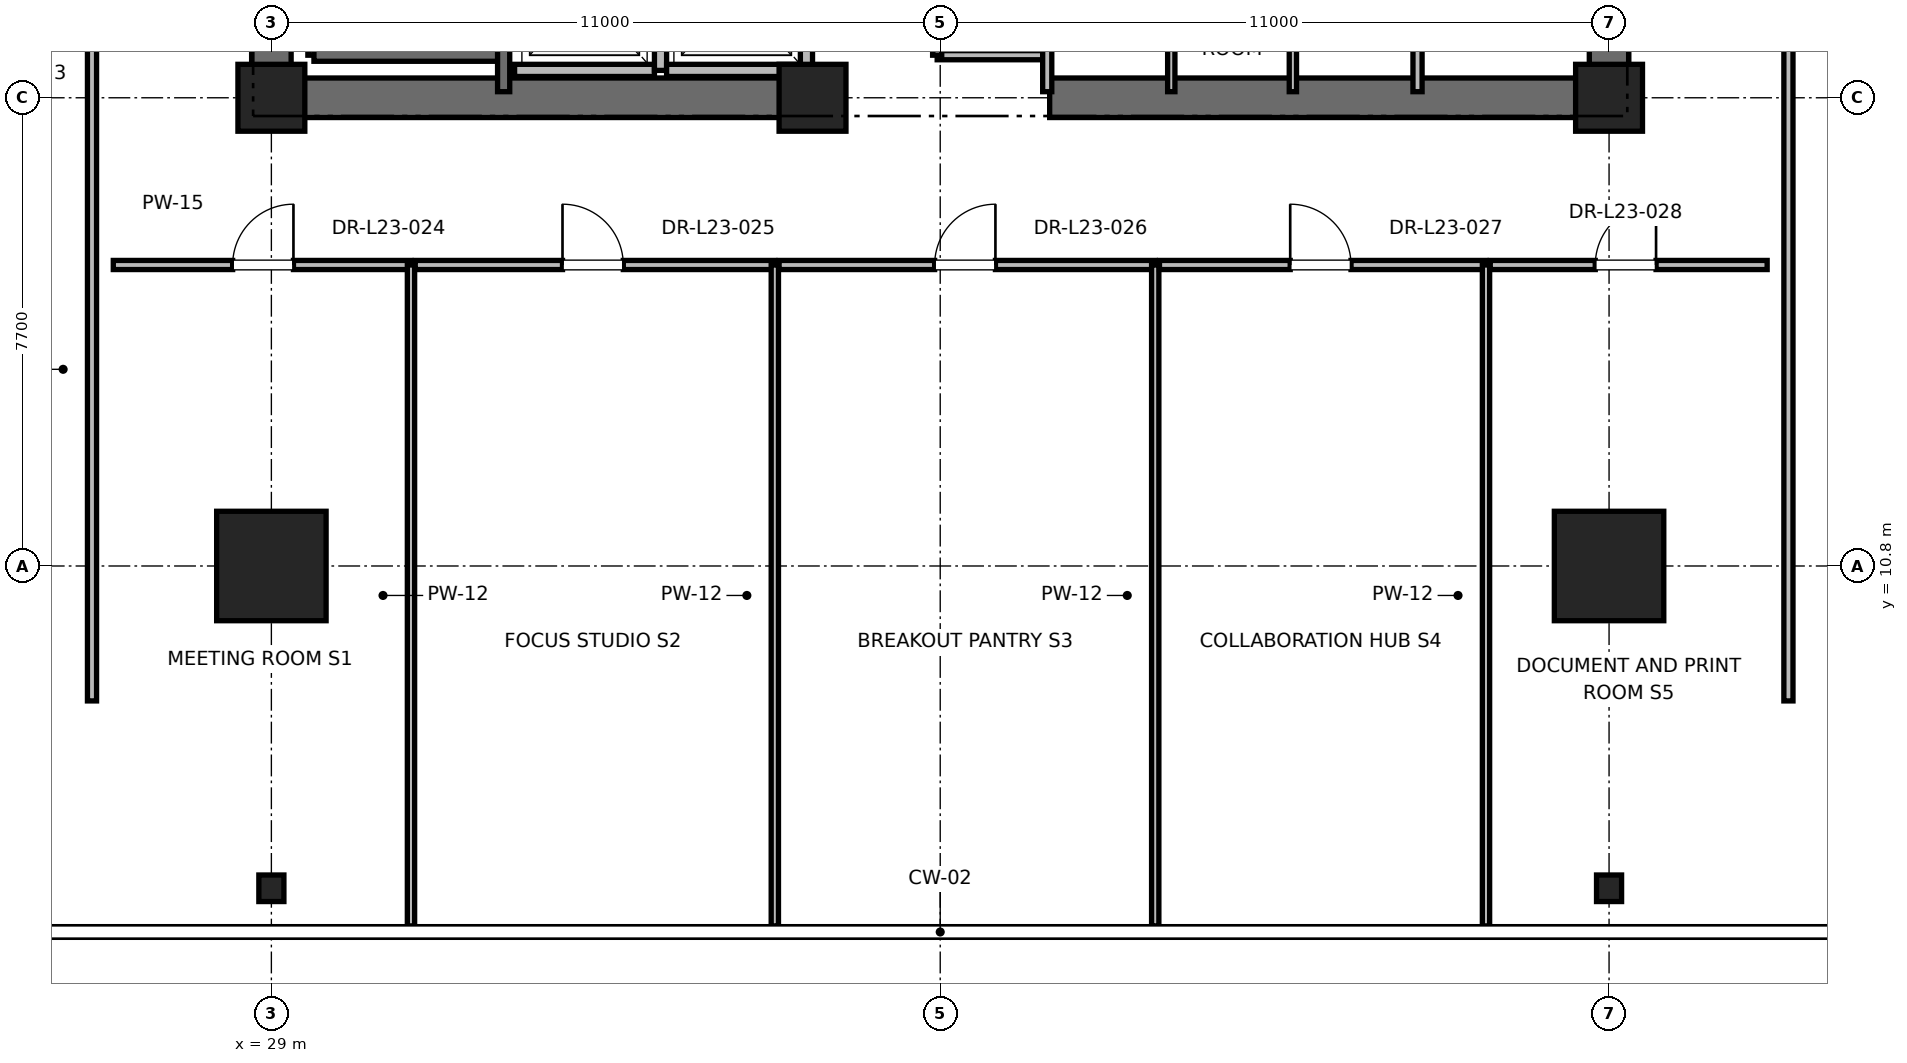
"""IFC4 building model, lengths in metres.
Left out: names, types, materials, properties, quantities, classifications, styles, units other than length and angle.
Written with IfcOpenShell. Run it as: python <this file> out.ifc"""

import sys

from ifc_helpers import new_model, si_unit, direction, frame, frame_2d, origin, origin_2d, place, context, subcontext, project, spatial, rectangle, i_section, extrude, element, fill, save


model = new_model("IFC4")
c1 = context("Model", 3, precision=1e-05, world=origin(), true_north=direction((0.0, 1.0)))
c2 = subcontext(c1, "Body", "Model", "MODEL_VIEW")
j1 = project(units=[si_unit("LENGTHUNIT", "METRE"), si_unit("PLANEANGLEUNIT", "RADIAN")], contexts=[c1])
p1 = place(None, origin())
s1 = spatial("IfcSite", under=j1, at=p1, CompositionType="ELEMENT")
p2 = place(p1, origin())
s2 = spatial("IfcBuilding", under=s1, at=p2, CompositionType="ELEMENT")
p3 = place(p2, frame((0.0, 0.0, 99.6)))
s3 = spatial("IfcBuildingStorey", under=s2, at=p3, CompositionType="ELEMENT", Elevation=99.6)
for number, where, z_axis, x_axis in (
    (1, (29.0, 10.8, 0.0), (0.0, 0.0, 1.0), (1.0, 0.0, 0.0)),
    (2, (51.0, 10.8, 0.0), (0.0, 0.0, 1.0), (1.0, 0.0, 0.0)),
):
    element("IfcColumn", number, at=place(p3, frame(where, z_axis=z_axis, x_axis=x_axis)), inside=s3, PredefinedType="COLUMN", context=c2, shape_type="SweptSolid", body=[
        extrude(rectangle(XDim=1.8, YDim=1.8, at=origin_2d()), origin(), (0.0, 0.0, 1.0), 4.0),
    ])
for number, where, z_axis, x_axis in (
    (3, (29.0, 5.5, 0.0), (0.0, 0.0, 1.0), (1.0, 0.0, 0.0)),
    (4, (51.0, 5.5, 0.0), (0.0, 0.0, 1.0), (1.0, 0.0, 0.0)),
):
    element("IfcColumn", number, at=place(p3, frame(where, z_axis=z_axis, x_axis=x_axis)), inside=s3, PredefinedType="COLUMN", context=c2, shape_type="SweptSolid", body=[
        extrude(i_section(OverallWidth=0.412, OverallDepth=0.437, WebThickness=0.036, FlangeThickness=0.058, FilletRadius=0.015, at=origin_2d()), origin(), (0.0, 0.0, 1.0), 4.0),
    ])
for number, where, z_axis, x_axis in (
    (5, (29.0, 18.5, 0.0), (0.0, 0.0, 1.0), (1.0, 0.0, 0.0)),
    (6, (51.0, 18.5, 0.0), (0.0, 0.0, 1.0), (1.0, 0.0, 0.0)),
    (7, (37.9, 18.5, 0.0), (0.0, 0.0, 1.0), (1.0, 0.0, 0.0)),
):
    element("IfcColumn", number, at=place(p3, frame(where, z_axis=z_axis, x_axis=x_axis)), inside=s3, PredefinedType="PILASTER", context=c2, shape_type="SweptSolid", body=[
        extrude(rectangle(XDim=1.1, YDim=1.1, at=origin_2d()), origin(), (0.0, 0.0, 1.0), 4.0),
    ])
for number, where, z_axis, x_axis in (
    (8, (29.0, 18.5, 0.0), (0.0, 0.0, 1.0), (1.0, 0.0, 0.0)),
    (9, (41.8, 18.5, 0.0), (0.0, 0.0, 1.0), (1.0, 0.0, 0.0)),
):
    element("IfcWall", number, at=place(p3, frame(where, z_axis=z_axis, x_axis=x_axis)), inside=s3, PredefinedType="SHEAR", context=c2, shape_type="SweptSolid", body=[
        extrude(rectangle(XDim=9.2, YDim=0.65, at=frame_2d((4.6, 0.0))), origin(), (0.0, 0.0, 1.0), 3.76),
    ])
p4 = place(p3, frame((29.0, 18.5, 0.0), z_axis=(0.0, 0.0, 1.0), x_axis=(0.0, 1.0, 0.0)))
e10 = element("IfcWall", 10, at=p4, inside=s3, PredefinedType="SHEAR", context=c2, shape_type="SweptSolid", body=[
    extrude(rectangle(XDim=8.8, YDim=0.65, at=frame_2d((4.4, 0.0))), origin(), (0.0, 0.0, 1.0), 3.76),
])
p5 = place(p3, frame((51.0, 18.5, 0.0), z_axis=(0.0, 0.0, 1.0), x_axis=(0.0, 1.0, 0.0)))
e11 = element("IfcWall", 11, at=p5, inside=s3, PredefinedType="SHEAR", context=c2, shape_type="SweptSolid", body=[
    extrude(rectangle(XDim=5.8, YDim=0.65, at=frame_2d((2.9, 0.0))), origin(), (0.0, 0.0, 1.0), 3.76),
])
p6 = place(p3, frame((29.7, 19.2, 0.0), z_axis=(0.0, 0.0, 1.0), x_axis=(0.0, 1.0, 0.0)))
e12 = element("IfcWall", 12, at=p6, inside=s3, PredefinedType="SOLIDWALL", context=c2, shape_type="SweptSolid", body=[
    extrude(rectangle(XDim=8.15, YDim=0.2, at=frame_2d((4.075, 0.0))), origin(), (0.0, 0.0, 1.0), 3.76),
])
p7 = place(p3, frame((29.7, 19.2, 0.0), z_axis=(0.0, 0.0, 1.0), x_axis=(1.0, 0.0, 0.0)))
e13 = element("IfcWall", 13, at=p7, inside=s3, PredefinedType="SOLIDWALL", context=c2, shape_type="SweptSolid", body=[
    extrude(rectangle(XDim=3.12, YDim=0.2, at=frame_2d((1.56, 0.0))), origin(), (0.0, 0.0, 1.0), 3.76),
])
p8 = place(p3, frame((32.82, 18.6, 0.0), z_axis=(0.0, 0.0, 1.0), x_axis=(0.0, 1.0, 0.0)))
e14 = element("IfcWall", 14, at=p8, inside=s3, PredefinedType="SOLIDWALL", context=c2, shape_type="SweptSolid", body=[
    extrude(rectangle(XDim=8.78, YDim=0.2, at=frame_2d((4.39, 0.0))), origin(), (0.0, 0.0, 1.0), 3.76),
])
p9 = place(p3, frame((33.0, 18.95, 0.0), z_axis=(0.0, 0.0, 1.0), x_axis=(1.0, 0.0, 0.0)))
e15 = element("IfcWall", 15, at=p9, inside=s3, PredefinedType="SOLIDWALL", context=c2, shape_type="SweptSolid", body=[
    extrude(rectangle(XDim=2.3, YDim=0.2, at=frame_2d((1.15, 0.0))), origin(), (0.0, 0.0, 1.0), 3.76),
])
p10 = place(p3, frame((35.4, 18.95, 0.0), z_axis=(0.0, 0.0, 1.0), x_axis=(0.0, 1.0, 0.0)))
e16 = element("IfcWall", 16, at=p10, inside=s3, PredefinedType="SOLIDWALL", context=c2, shape_type="SweptSolid", body=[
    extrude(rectangle(XDim=2.6, YDim=0.2, at=frame_2d((1.3, 0.0))), origin(), (0.0, 0.0, 1.0), 3.76),
])
p11 = place(p3, frame((35.5, 18.95, 0.0), z_axis=(0.0, 0.0, 1.0), x_axis=(1.0, 0.0, 0.0)))
e17 = element("IfcWall", 17, at=p11, inside=s3, PredefinedType="SOLIDWALL", context=c2, shape_type="SweptSolid", body=[
    extrude(rectangle(XDim=2.3, YDim=0.2, at=frame_2d((1.15, 0.0))), origin(), (0.0, 0.0, 1.0), 2.54),
])
p12 = place(p3, frame((37.8, 18.95, 0.0), z_axis=(0.0, 0.0, 1.0), x_axis=(0.0, 1.0, 0.0)))
e18 = element("IfcWall", 18, at=p12, inside=s3, PredefinedType="SOLIDWALL", context=c2, shape_type="SweptSolid", body=[
    extrude(rectangle(XDim=2.6, YDim=0.2, at=frame_2d((1.3, 0.0))), origin(), (0.0, 0.0, 1.0), 2.54),
])
p13 = place(p3, frame((39.95, 19.2, 0.0), z_axis=(0.0, 0.0, 1.0), x_axis=(1.0, 0.0, 0.0)))
e19 = element("IfcWall", 19, at=p13, inside=s3, PredefinedType="PARTITIONING", context=c2, shape_type="SweptSolid", body=[
    extrude(rectangle(XDim=1.81, YDim=0.15, at=frame_2d((0.905, 0.0))), origin(), (0.0, 0.0, 1.0), 2.85),
])
p14 = place(p3, frame((41.76, 18.6, 0.0), z_axis=(0.0, 0.0, 1.0), x_axis=(0.0, 1.0, 0.0)))
e20 = element("IfcWall", 20, at=p14, inside=s3, PredefinedType="PARTITIONING", context=c2, shape_type="SweptSolid", body=[
    extrude(rectangle(XDim=3.6, YDim=0.15, at=frame_2d((1.8, 0.0))), origin(), (0.0, 0.0, 1.0), 2.54),
])
p15 = place(p3, frame((39.95, 19.2, 0.0), z_axis=(0.0, 0.0, 1.0), x_axis=(0.0, 1.0, 0.0)))
e21 = element("IfcWall", 21, at=p15, inside=s3, PredefinedType="PARTITIONING", context=c2, shape_type="SweptSolid", body=[
    extrude(rectangle(XDim=3.0, YDim=0.15, at=frame_2d((1.5, 0.0))), origin(), (0.0, 0.0, 1.0), 2.85),
])
p16 = place(p15, frame((1.05, 0.0, 0.0)))
e22 = element("IfcOpeningElement", 22, at=p16, cuts=e21, PredefinedType="OPENING", context=c2, shape_type="SweptSolid", body=[
    extrude(rectangle(XDim=0.9, YDim=2.1, at=frame_2d((0.45, 1.05))), frame((0.0, 0.075, 0.0), z_axis=(0.0, -1.0, 0.0), x_axis=(1.0, 0.0, 0.0)), (0.0, 0.0, 1.0), 0.15),
])
p17 = place(p3, frame((47.85, 18.6, 0.0), z_axis=(0.0, 0.0, 1.0), x_axis=(0.0, 1.0, 0.0)))
e23 = element("IfcWall", 23, at=p17, inside=s3, PredefinedType="PARTITIONING", context=c2, shape_type="SweptSolid", body=[
    extrude(rectangle(XDim=2.54, YDim=0.15, at=frame_2d((1.27, 0.0))), origin(), (0.0, 0.0, 1.0), 2.85),
])
for number, where, z_axis, x_axis in (
    (24, (43.8, 18.6, 0.0), (0.0, 0.0, 1.0), (0.0, 1.0, 0.0)),
    (25, (45.8, 18.6, 0.0), (0.0, 0.0, 1.0), (0.0, 1.0, 0.0)),
):
    element("IfcWall", number, at=place(p3, frame(where, z_axis=z_axis, x_axis=x_axis)), inside=s3, PredefinedType="PARTITIONING", context=c2, shape_type="SweptSolid", body=[
        extrude(rectangle(XDim=3.02, YDim=0.12, at=frame_2d((1.51, 0.0))), origin(), (0.0, 0.0, 1.0), 2.85),
    ])
p18 = place(p3, frame((26.4, 15.75, 0.0), z_axis=(0.0, 0.0, 1.0), x_axis=(1.0, 0.0, 0.0)))
e26 = element("IfcWall", 26, at=p18, inside=s3, PredefinedType="PARTITIONING", context=c2, shape_type="SweptSolid", body=[
    extrude(rectangle(XDim=4.896, YDim=0.15, at=frame_2d((2.448, 0.0))), origin(), (0.0, 0.0, 1.0), 2.85),
])
p19 = place(p18, frame((1.963, 0.0, 0.0)))
e27 = element("IfcOpeningElement", 27, at=p19, cuts=e26, PredefinedType="OPENING", context=c2, shape_type="SweptSolid", body=[
    extrude(rectangle(XDim=1.0, YDim=2.15, at=frame_2d((0.5, 1.075))), frame((0.0, 0.075, 0.0), z_axis=(0.0, -1.0, 0.0), x_axis=(1.0, 0.0, 0.0)), (0.0, 0.0, 1.0), 0.15),
])
p20 = place(p3, frame((31.296, 4.881, 0.0), z_axis=(0.0, 0.0, 1.0), x_axis=(0.0, 1.0, 0.0)))
e28 = element("IfcWall", 28, at=p20, inside=s3, PredefinedType="PARTITIONING", context=c2, shape_type="SweptSolid", body=[
    extrude(rectangle(XDim=10.869, YDim=0.12, at=frame_2d((5.435, 0.0))), origin(), (0.0, 0.0, 1.0), 2.39),
])
p21 = place(p3, frame((31.366, 15.75, 0.0), z_axis=(0.0, 0.0, 1.0), x_axis=(1.0, 0.0, 0.0)))
e29 = element("IfcWall", 29, at=p21, inside=s3, PredefinedType="PARTITIONING", context=c2, shape_type="SweptSolid", body=[
    extrude(rectangle(XDim=5.914, YDim=0.15, at=frame_2d((2.957, 0.0))), origin(), (0.0, 0.0, 1.0), 2.85),
])
p22 = place(p21, frame((2.422, 0.0, 0.0)))
e30 = element("IfcOpeningElement", 30, at=p22, cuts=e29, PredefinedType="OPENING", context=c2, shape_type="SweptSolid", body=[
    extrude(rectangle(XDim=1.0, YDim=2.15, at=frame_2d((0.5, 1.075))), frame((0.0, 0.075, 0.0), z_axis=(0.0, -1.0, 0.0), x_axis=(1.0, 0.0, 0.0)), (0.0, 0.0, 1.0), 0.15),
])
p23 = place(p3, frame((37.28, 4.881, 0.0), z_axis=(0.0, 0.0, 1.0), x_axis=(0.0, 1.0, 0.0)))
e31 = element("IfcWall", 31, at=p23, inside=s3, PredefinedType="PARTITIONING", context=c2, shape_type="SweptSolid", body=[
    extrude(rectangle(XDim=10.869, YDim=0.12, at=frame_2d((5.435, 0.0))), origin(), (0.0, 0.0, 1.0), 2.39),
])
p24 = place(p3, frame((37.35, 15.75, 0.0), z_axis=(0.0, 0.0, 1.0), x_axis=(1.0, 0.0, 0.0)))
e32 = element("IfcWall", 32, at=p24, inside=s3, PredefinedType="PARTITIONING", context=c2, shape_type="SweptSolid", body=[
    extrude(rectangle(XDim=6.186, YDim=0.15, at=frame_2d((3.093, 0.0))), origin(), (0.0, 0.0, 1.0), 2.85),
])
p25 = place(p24, frame((2.558, 0.0, 0.0)))
e33 = element("IfcOpeningElement", 33, at=p25, cuts=e32, PredefinedType="OPENING", context=c2, shape_type="SweptSolid", body=[
    extrude(rectangle(XDim=1.0, YDim=2.15, at=frame_2d((0.5, 1.075))), frame((0.0, 0.075, 0.0), z_axis=(0.0, -1.0, 0.0), x_axis=(1.0, 0.0, 0.0)), (0.0, 0.0, 1.0), 0.15),
])
p26 = place(p3, frame((43.536, 4.881, 0.0), z_axis=(0.0, 0.0, 1.0), x_axis=(0.0, 1.0, 0.0)))
e34 = element("IfcWall", 34, at=p26, inside=s3, PredefinedType="PARTITIONING", context=c2, shape_type="SweptSolid", body=[
    extrude(rectangle(XDim=10.869, YDim=0.12, at=frame_2d((5.435, 0.0))), origin(), (0.0, 0.0, 1.0), 2.39),
])
p27 = place(p3, frame((43.606, 15.75, 0.0), z_axis=(0.0, 0.0, 1.0), x_axis=(1.0, 0.0, 0.0)))
e35 = element("IfcWall", 35, at=p27, inside=s3, PredefinedType="PARTITIONING", context=c2, shape_type="SweptSolid", body=[
    extrude(rectangle(XDim=5.37, YDim=0.15, at=frame_2d((2.685, 0.0))), origin(), (0.0, 0.0, 1.0), 2.85),
])
p28 = place(p27, frame((2.15, 0.0, 0.0)))
e36 = element("IfcOpeningElement", 36, at=p28, cuts=e35, PredefinedType="OPENING", context=c2, shape_type="SweptSolid", body=[
    extrude(rectangle(XDim=1.0, YDim=2.15, at=frame_2d((0.5, 1.075))), frame((0.0, 0.075, 0.0), z_axis=(0.0, -1.0, 0.0), x_axis=(1.0, 0.0, 0.0)), (0.0, 0.0, 1.0), 0.15),
])
p29 = place(p3, frame((48.976, 4.881, 0.0), z_axis=(0.0, 0.0, 1.0), x_axis=(0.0, 1.0, 0.0)))
e37 = element("IfcWall", 37, at=p29, inside=s3, PredefinedType="PARTITIONING", context=c2, shape_type="SweptSolid", body=[
    extrude(rectangle(XDim=10.869, YDim=0.12, at=frame_2d((5.435, 0.0))), origin(), (0.0, 0.0, 1.0), 2.39),
])
p30 = place(p3, frame((49.046, 15.75, 0.0), z_axis=(0.0, 0.0, 1.0), x_axis=(1.0, 0.0, 0.0)))
e38 = element("IfcWall", 38, at=p30, inside=s3, PredefinedType="PARTITIONING", context=c2, shape_type="SweptSolid", body=[
    extrude(rectangle(XDim=4.554, YDim=0.15, at=frame_2d((2.277, 0.0))), origin(), (0.0, 0.0, 1.0), 2.85),
])
p31 = place(p30, frame((1.727, 0.0, 0.0)))
e39 = element("IfcOpeningElement", 39, at=p31, cuts=e38, PredefinedType="OPENING", context=c2, shape_type="SweptSolid", body=[
    extrude(rectangle(XDim=1.0, YDim=2.15, at=frame_2d((0.5, 1.075))), frame((0.0, 0.075, 0.0), z_axis=(0.0, -1.0, 0.0), x_axis=(1.0, 0.0, 0.0)), (0.0, 0.0, 1.0), 0.15),
])
p32 = place(p3, frame((26.05, 8.581, 0.0), z_axis=(0.0, 0.0, 1.0), x_axis=(0.0, 1.0, 0.0)))
e40 = element("IfcWall", 40, at=p32, inside=s3, PredefinedType="PARTITIONING", context=c2, shape_type="SweptSolid", body=[
    extrude(rectangle(XDim=12.865, YDim=0.15, at=frame_2d((6.432, 0.0))), origin(), (0.0, 0.0, 1.0), 2.85),
])
p33 = place(p32, frame((10.907, 0.0, 0.0)))
e41 = element("IfcOpeningElement", 41, at=p33, cuts=e40, PredefinedType="OPENING", context=c2, shape_type="SweptSolid", body=[
    extrude(rectangle(XDim=1.0, YDim=2.15, at=frame_2d((0.5, 1.075))), frame((0.0, 0.075, 0.0), z_axis=(0.0, -1.0, 0.0), x_axis=(1.0, 0.0, 0.0)), (0.0, 0.0, 1.0), 0.15),
])
p34 = place(p3, frame((53.95, 8.581, 0.0), z_axis=(0.0, 0.0, 1.0), x_axis=(0.0, 1.0, 0.0)))
e42 = element("IfcWall", 42, at=p34, inside=s3, PredefinedType="PARTITIONING", context=c2, shape_type="SweptSolid", body=[
    extrude(rectangle(XDim=15.892, YDim=0.15, at=frame_2d((7.946, 0.0))), origin(), (0.0, 0.0, 1.0), 2.85),
])
p35 = place(p34, frame((12.42, 0.0, 0.0)))
e43 = element("IfcOpeningElement", 43, at=p35, cuts=e42, PredefinedType="OPENING", context=c2, shape_type="SweptSolid", body=[
    extrude(rectangle(XDim=1.0, YDim=2.15, at=frame_2d((0.5, 1.075))), frame((0.0, 0.075, 0.0), z_axis=(0.0, -1.0, 0.0), x_axis=(1.0, 0.0, 0.0)), (0.0, 0.0, 1.0), 0.15),
])
p36 = place(p19, origin())
e44 = element("IfcDoor", 44, at=p36, inside=s3, OperationType="SINGLE_SWING_RIGHT", PredefinedType="DOOR", context=c2, shape_type="SweptSolid", body=[
    extrude(rectangle(XDim=1.0, YDim=2.15, at=frame_2d((0.5, 1.075))), frame((0.0, 0.025, 0.0), z_axis=(0.0, -1.0, 0.0), x_axis=(1.0, 0.0, 0.0)), (0.0, 0.0, 1.0), 0.05),
])
fill(e27, e44)
p37 = place(p22, origin())
e45 = element("IfcDoor", 45, at=p37, inside=s3, OperationType="SINGLE_SWING_LEFT", PredefinedType="DOOR", context=c2, shape_type="SweptSolid", body=[
    extrude(rectangle(XDim=1.0, YDim=2.15, at=frame_2d((0.5, 1.075))), frame((0.0, 0.025, 0.0), z_axis=(0.0, -1.0, 0.0), x_axis=(1.0, 0.0, 0.0)), (0.0, 0.0, 1.0), 0.05),
])
fill(e30, e45)
p38 = place(p25, origin())
e46 = element("IfcDoor", 46, at=p38, inside=s3, OperationType="SINGLE_SWING_RIGHT", PredefinedType="DOOR", context=c2, shape_type="SweptSolid", body=[
    extrude(rectangle(XDim=1.0, YDim=2.15, at=frame_2d((0.5, 1.075))), frame((0.0, 0.025, 0.0), z_axis=(0.0, -1.0, 0.0), x_axis=(1.0, 0.0, 0.0)), (0.0, 0.0, 1.0), 0.05),
])
fill(e33, e46)
p39 = place(p28, origin())
e47 = element("IfcDoor", 47, at=p39, inside=s3, OperationType="SINGLE_SWING_LEFT", PredefinedType="DOOR", context=c2, shape_type="SweptSolid", body=[
    extrude(rectangle(XDim=1.0, YDim=2.15, at=frame_2d((0.5, 1.075))), frame((0.0, 0.025, 0.0), z_axis=(0.0, -1.0, 0.0), x_axis=(1.0, 0.0, 0.0)), (0.0, 0.0, 1.0), 0.05),
])
fill(e36, e47)
p40 = place(p31, origin())
e48 = element("IfcDoor", 48, at=p40, inside=s3, OperationType="SINGLE_SWING_RIGHT", PredefinedType="DOOR", context=c2, shape_type="SweptSolid", body=[
    extrude(rectangle(XDim=1.0, YDim=2.15, at=frame_2d((0.5, 1.075))), frame((0.0, 0.025, 0.0), z_axis=(0.0, -1.0, 0.0), x_axis=(1.0, 0.0, 0.0)), (0.0, 0.0, 1.0), 0.05),
])
fill(e39, e48)
save(model, sys.argv[1])
